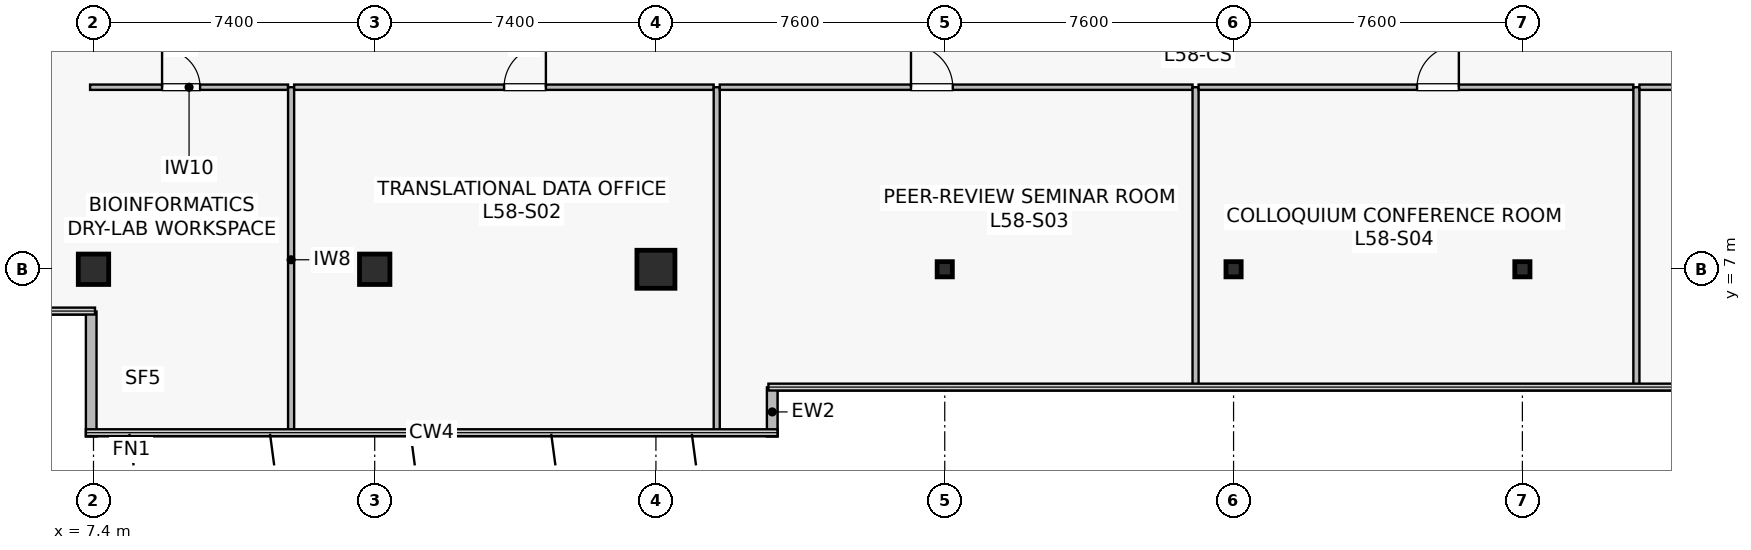
"""IFC4 building model, lengths in metres.
Left out: names, types, materials, properties, quantities, classifications, styles, units other than length and angle.
Written with IfcOpenShell. Run it as: python <this file> out.ifc"""

import sys

from ifc_helpers import new_model, si_unit, direction, frame, frame_2d, origin, origin_2d, place, context, subcontext, project, spatial, rectangle, hollow_rectangle, extrude, source, transform, mapped, element, fill, save


model = new_model("IFC4")
c1 = context("Model", 3, precision=1e-05, world=origin(), true_north=direction((0.0, 1.0)))
c2 = subcontext(c1, "Body", "Model", "MODEL_VIEW")
j1 = project(units=[si_unit("LENGTHUNIT", "METRE"), si_unit("PLANEANGLEUNIT", "RADIAN")], contexts=[c1])
p1 = place(None, origin())
s1 = spatial("IfcSite", under=j1, at=p1, CompositionType="ELEMENT")
p2 = place(p1, origin())
s2 = spatial("IfcBuilding", under=s1, at=p2, CompositionType="ELEMENT")
p3 = place(p2, frame((0.0, 0.0, 242.4)))
s3 = spatial("IfcBuildingStorey", under=s2, at=p3, CompositionType="ELEMENT", Elevation=242.4)
m1 = source(origin(), c2, "Body", "SweptSolid", [
    extrude(rectangle(XDim=0.8, YDim=0.8, at=origin_2d()), origin(), (0.0, 0.0, 1.0), 4.1),
])
p4 = place(p3, frame((14.8, 7.0, 0.0), z_axis=(0.0, 0.0, 1.0), x_axis=(1.0, 0.0, 0.0)))
e1 = element("IfcColumn", 1, at=p4, inside=s3, PredefinedType="COLUMN", context=c2, shape_type="MappedRepresentation", body=[
    mapped(m1, transform((0.0, 0.0, 0.0), scale=1.0)),
])
m2 = source(origin(), c2, "Body", "SweptSolid", [
    extrude(rectangle(XDim=1.0, YDim=1.0, at=origin_2d()), origin(), (0.0, 0.0, 1.0), 4.1),
])
p5 = place(p3, frame((22.2, 7.0, 0.0), z_axis=(0.0, 0.0, 1.0), x_axis=(1.0, 0.0, 0.0)))
e2 = element("IfcColumn", 2, at=p5, inside=s3, PredefinedType="COLUMN", context=c2, shape_type="MappedRepresentation", body=[
    mapped(m2, transform((0.0, 0.0, 0.0), scale=1.0)),
])
p6 = place(p3, frame((7.4, 7.0, 0.0), z_axis=(0.0, 0.0, 1.0), x_axis=(1.0, 0.0, 0.0)))
e3 = element("IfcColumn", 3, at=p6, inside=s3, PredefinedType="COLUMN", context=c2, shape_type="MappedRepresentation", body=[
    mapped(m1, transform((0.0, 0.0, 0.0), scale=1.0)),
])
m3 = source(origin(), c2, "Body", "SweptSolid", [
    extrude(hollow_rectangle(XDim=0.4, YDim=0.4, WallThickness=0.019, at=origin_2d()), origin(), (0.0, 0.0, 1.0), 4.1),
])
for number, where, z_axis, x_axis in (
    (4, (29.8, 7.0, 0.0), (0.0, 0.0, 1.0), (1.0, 0.0, 0.0)),
    (5, (37.4, 7.0, 0.0), (0.0, 0.0, 1.0), (1.0, 0.0, 0.0)),
    (6, (45.0, 7.0, 0.0), (0.0, 0.0, 1.0), (1.0, 0.0, 0.0)),
):
    element("IfcColumn", number, at=place(p3, frame(where, z_axis=z_axis, x_axis=x_axis)), inside=s3, PredefinedType="COLUMN", context=c2, shape_type="MappedRepresentation", body=[
        mapped(m3, transform((0.0, 0.0, 0.0), scale=1.0)),
    ])
p7 = place(p3, frame((25.26, 2.6, 0.0), z_axis=(0.0, 0.0, 1.0), x_axis=(0.0, 1.0, 0.0)))
e7 = element("IfcWall", 7, at=p7, inside=s3, PredefinedType="STANDARD", context=c2, shape_type="SweptSolid", body=[
    extrude(rectangle(XDim=1.293, YDim=0.28, at=frame_2d((0.646, 0.0))), origin(), (0.0, 0.0, 1.0), 3.8),
])
p8 = place(p3, frame((7.34, 5.888, 0.0), z_axis=(0.0, 0.0, 1.0), x_axis=(0.0, -1.0, 0.0)))
e8 = element("IfcWall", 8, at=p8, inside=s3, PredefinedType="STANDARD", context=c2, shape_type="SweptSolid", body=[
    extrude(rectangle(XDim=3.288, YDim=0.28, at=frame_2d((1.644, 0.0))), origin(), (0.0, 0.0, 1.0), 3.8),
])
p9 = place(p3, frame((7.31, 11.79, 0.0), z_axis=(0.0, 0.0, 1.0), x_axis=(1.0, 0.0, 0.0)))
e9 = element("IfcWall", 9, at=p9, inside=s3, PredefinedType="PARTITIONING", context=c2, shape_type="SweptSolid", body=[
    extrude(rectangle(XDim=5.21, YDim=0.14, at=frame_2d((2.605, 0.0))), origin(), (0.0, 0.0, 1.0), 3.335),
])
p10 = place(p9, frame((1.894, 0.0, 0.0)))
e10 = element("IfcOpeningElement", 10, at=p10, cuts=e9, PredefinedType="OPENING", context=c2, shape_type="SweptSolid", body=[
    extrude(rectangle(XDim=1.0, YDim=2.15, at=frame_2d((0.5, 1.075))), frame((0.0, 0.08, 0.0), z_axis=(0.0, -1.0, 0.0), x_axis=(1.0, 0.0, 0.0)), (0.0, 0.0, 1.0), 0.16),
])
p11 = place(p3, frame((12.6, 2.71, 0.0), z_axis=(0.0, 0.0, 1.0), x_axis=(0.0, 1.0, 0.0)))
e11 = element("IfcWall", 11, at=p11, inside=s3, PredefinedType="PARTITIONING", context=c2, shape_type="SweptSolid", body=[
    extrude(rectangle(XDim=9.08, YDim=0.16, at=frame_2d((4.54, 0.0))), origin(), (0.0, 0.0, 1.0), 3.135),
])
p12 = place(p3, frame((12.68, 11.79, 0.0), z_axis=(0.0, 0.0, 1.0), x_axis=(1.0, 0.0, 0.0)))
e12 = element("IfcWall", 12, at=p12, inside=s3, PredefinedType="PARTITIONING", context=c2, shape_type="SweptSolid", body=[
    extrude(rectangle(XDim=11.04, YDim=0.14, at=frame_2d((5.52, 0.0))), origin(), (0.0, 0.0, 1.0), 3.197),
])
p13 = place(p12, frame((5.524, 0.0, 0.0)))
e13 = element("IfcOpeningElement", 13, at=p13, cuts=e12, PredefinedType="OPENING", context=c2, shape_type="SweptSolid", body=[
    extrude(rectangle(XDim=1.1, YDim=2.18, at=frame_2d((0.55, 1.09))), frame((0.0, 0.08, 0.0), z_axis=(0.0, -1.0, 0.0), x_axis=(1.0, 0.0, 0.0)), (0.0, 0.0, 1.0), 0.16),
])
p14 = place(p3, frame((23.8, 2.71, 0.0), z_axis=(0.0, 0.0, 1.0), x_axis=(0.0, 1.0, 0.0)))
e14 = element("IfcWall", 14, at=p14, inside=s3, PredefinedType="PARTITIONING", context=c2, shape_type="SweptSolid", body=[
    extrude(rectangle(XDim=9.08, YDim=0.16, at=frame_2d((4.54, 0.0))), origin(), (0.0, 0.0, 1.0), 3.135),
])
p15 = place(p3, frame((23.88, 11.79, 0.0), z_axis=(0.0, 0.0, 1.0), x_axis=(1.0, 0.0, 0.0)))
e15 = element("IfcWall", 15, at=p15, inside=s3, PredefinedType="PARTITIONING", context=c2, shape_type="SweptSolid", body=[
    extrude(rectangle(XDim=12.44, YDim=0.14, at=frame_2d((6.22, 0.0))), origin(), (0.0, 0.0, 1.0), 3.197),
])
p16 = place(p15, frame((5.031, 0.0, 0.0)))
e16 = element("IfcOpeningElement", 16, at=p16, cuts=e15, PredefinedType="OPENING", context=c2, shape_type="SweptSolid", body=[
    extrude(rectangle(XDim=1.1, YDim=2.18, at=frame_2d((0.55, 1.09))), frame((0.0, 0.08, 0.0), z_axis=(0.0, -1.0, 0.0), x_axis=(1.0, 0.0, 0.0)), (0.0, 0.0, 1.0), 0.16),
])
p17 = place(p3, frame((36.4, 3.91, 0.0), z_axis=(0.0, 0.0, 1.0), x_axis=(0.0, 1.0, 0.0)))
e17 = element("IfcWall", 17, at=p17, inside=s3, PredefinedType="PARTITIONING", context=c2, shape_type="SweptSolid", body=[
    extrude(rectangle(XDim=7.88, YDim=0.16, at=frame_2d((3.94, 0.0))), origin(), (0.0, 0.0, 1.0), 3.135),
])
p18 = place(p3, frame((36.48, 11.79, 0.0), z_axis=(0.0, 0.0, 1.0), x_axis=(1.0, 0.0, 0.0)))
e18 = element("IfcWall", 18, at=p18, inside=s3, PredefinedType="PARTITIONING", context=c2, shape_type="SweptSolid", body=[
    extrude(rectangle(XDim=11.44, YDim=0.14, at=frame_2d((5.72, 0.0))), origin(), (0.0, 0.0, 1.0), 3.197),
])
p19 = place(p18, frame((5.748, 0.0, 0.0)))
e19 = element("IfcOpeningElement", 19, at=p19, cuts=e18, PredefinedType="OPENING", context=c2, shape_type="SweptSolid", body=[
    extrude(rectangle(XDim=1.1, YDim=2.18, at=frame_2d((0.55, 1.09))), frame((0.0, 0.08, 0.0), z_axis=(0.0, -1.0, 0.0), x_axis=(1.0, 0.0, 0.0)), (0.0, 0.0, 1.0), 0.16),
])
p20 = place(p3, frame((48.0, 3.91, 0.0), z_axis=(0.0, 0.0, 1.0), x_axis=(0.0, 1.0, 0.0)))
e20 = element("IfcWall", 20, at=p20, inside=s3, PredefinedType="PARTITIONING", context=c2, shape_type="SweptSolid", body=[
    extrude(rectangle(XDim=7.88, YDim=0.16, at=frame_2d((3.94, 0.0))), origin(), (0.0, 0.0, 1.0), 3.135),
])
p21 = place(p3, frame((48.08, 11.79, 0.0), z_axis=(0.0, 0.0, 1.0), x_axis=(1.0, 0.0, 0.0)))
e21 = element("IfcWall", 21, at=p21, inside=s3, PredefinedType="PARTITIONING", context=c2, shape_type="SweptSolid", body=[
    extrude(rectangle(XDim=11.24, YDim=0.14, at=frame_2d((5.62, 0.0))), origin(), (0.0, 0.0, 1.0), 3.197),
])
p22 = place(p21, frame((4.504, 0.0, 0.0)))
e22 = element("IfcOpeningElement", 22, at=p22, cuts=e21, PredefinedType="OPENING", context=c2, shape_type="SweptSolid", body=[
    extrude(rectangle(XDim=1.1, YDim=2.18, at=frame_2d((0.55, 1.09))), frame((0.0, 0.08, 0.0), z_axis=(0.0, -1.0, 0.0), x_axis=(1.0, 0.0, 0.0)), (0.0, 0.0, 1.0), 0.16),
])
m4 = source(origin(), c2, "Body", "SweptSolid", [
    extrude(rectangle(XDim=1.0, YDim=2.15, at=frame_2d((0.5, 1.075))), frame((0.0, 0.025, 0.0), z_axis=(0.0, -1.0, 0.0), x_axis=(1.0, 0.0, 0.0)), (0.0, 0.0, 1.0), 0.05),
])
p23 = place(p10, origin())
e23 = element("IfcDoor", 23, at=p23, inside=s3, OperationType="SINGLE_SWING_LEFT", PredefinedType="DOOR", context=c2, shape_type="MappedRepresentation", body=[
    mapped(m4, transform((0.0, 0.0, 0.0), scale=1.0)),
])
fill(e10, e23)
m5 = source(origin(), c2, "Body", "SweptSolid", [
    extrude(rectangle(XDim=1.1, YDim=2.18, at=frame_2d((0.55, 1.09))), frame((0.0, 0.025, 0.0), z_axis=(0.0, -1.0, 0.0), x_axis=(1.0, 0.0, 0.0)), (0.0, 0.0, 1.0), 0.05),
])
p24 = place(p13, origin())
e24 = element("IfcDoor", 24, at=p24, inside=s3, OperationType="SINGLE_SWING_RIGHT", PredefinedType="DOOR", context=c2, shape_type="MappedRepresentation", body=[
    mapped(m5, transform((0.0, 0.0, 0.0), scale=1.0)),
])
fill(e13, e24)
p25 = place(p16, origin())
e25 = element("IfcDoor", 25, at=p25, inside=s3, OperationType="SINGLE_SWING_LEFT", PredefinedType="DOOR", context=c2, shape_type="MappedRepresentation", body=[
    mapped(m5, transform((0.0, 0.0, 0.0), scale=1.0)),
])
fill(e16, e25)
p26 = place(p19, origin())
e26 = element("IfcDoor", 26, at=p26, inside=s3, OperationType="SINGLE_SWING_RIGHT", PredefinedType="DOOR", context=c2, shape_type="MappedRepresentation", body=[
    mapped(m5, transform((0.0, 0.0, 0.0), scale=1.0)),
])
fill(e19, e26)
save(model, sys.argv[1])
